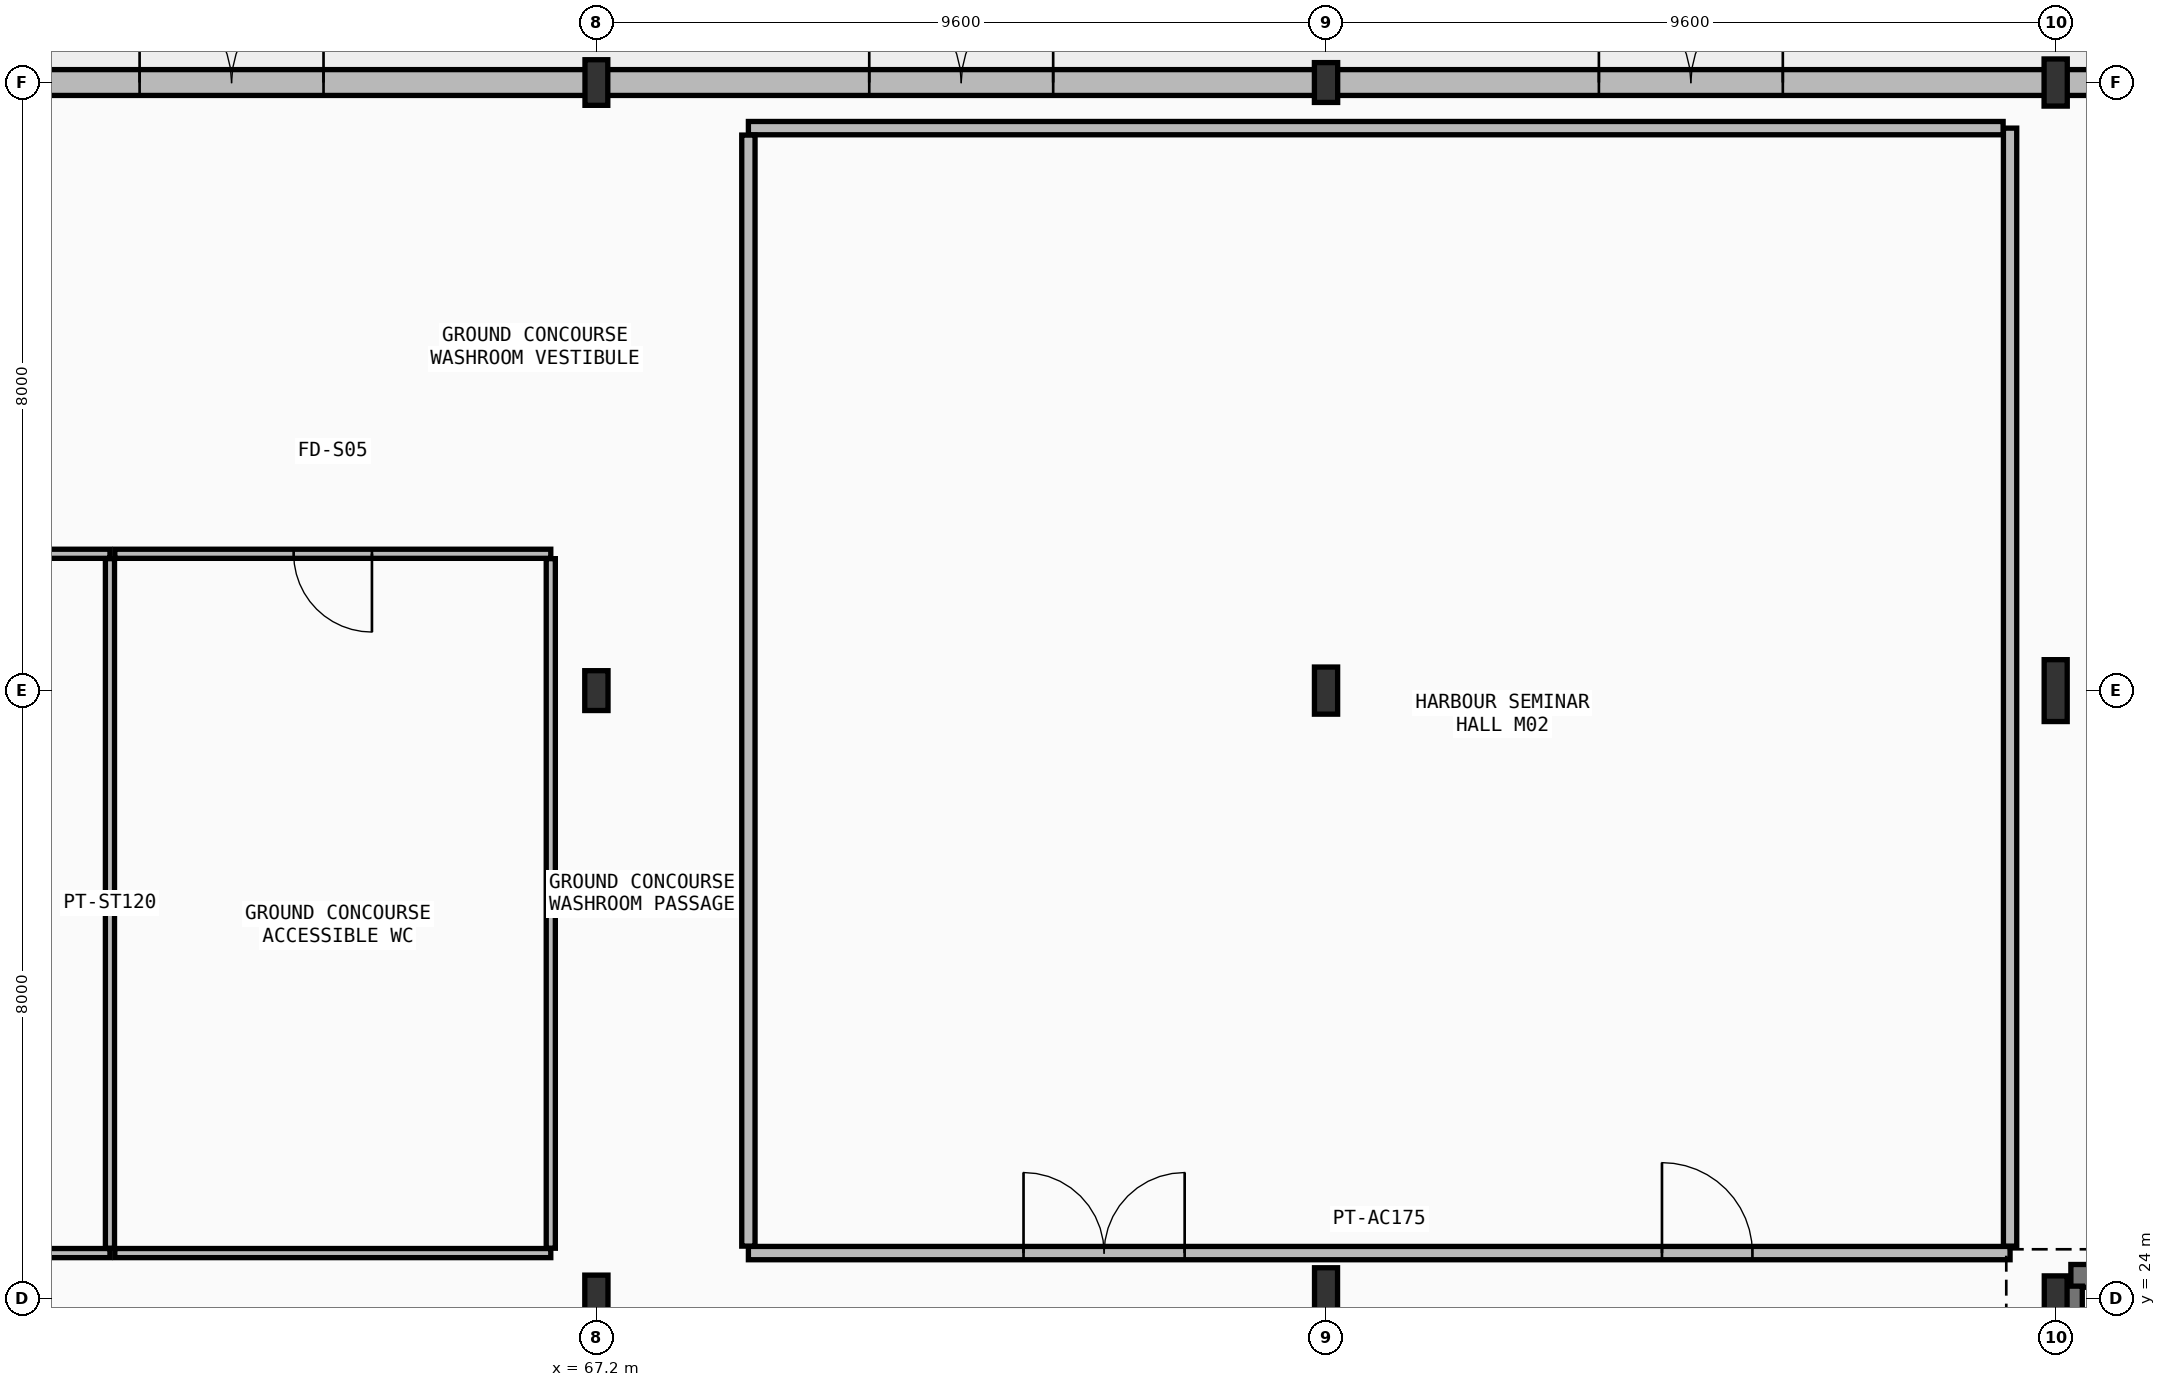
"""IFC4 building model, lengths in metres.
Left out: names, types, materials, properties, quantities, classifications, styles, units other than length and angle.
Written with IfcOpenShell. Run it as: python <this file> out.ifc"""

import sys

from ifc_helpers import new_model, si_unit, direction, frame, frame_2d, origin, origin_2d, place, context, subcontext, project, spatial, rectangle, i_section, extrude, element, fill, save


model = new_model("IFC4")
c1 = context("Model", 3, precision=1e-05, world=origin(), true_north=direction((0.0, 1.0)))
c2 = subcontext(c1, "Body", "Model", "MODEL_VIEW")
j1 = project(units=[si_unit("LENGTHUNIT", "METRE"), si_unit("PLANEANGLEUNIT", "RADIAN")], contexts=[c1])
p1 = place(None, origin())
s1 = spatial("IfcSite", under=j1, at=p1, CompositionType="ELEMENT")
p2 = place(p1, origin())
s2 = spatial("IfcBuilding", under=s1, at=p2, CompositionType="ELEMENT")
p3 = place(p2, origin())
s3 = spatial("IfcBuildingStorey", under=s2, at=p3, CompositionType="ELEMENT", Elevation=0.0)
p4 = place(p3, frame((67.2, 24.0, 0.0), z_axis=(0.0, 0.0, 1.0), x_axis=(1.0, 0.0, 0.0)))
e1 = element("IfcColumn", 1, at=p4, inside=s3, PredefinedType="COLUMN", context=c2, shape_type="SweptSolid", body=[
    extrude(i_section(OverallWidth=0.305, OverallDepth=0.62, WebThickness=0.021, FlangeThickness=0.04, FilletRadius=0.027, at=origin_2d()), origin(), (0.0, 0.0, 1.0), 6.0),
])
p5 = place(p3, frame((67.2, 32.0, 0.0), z_axis=(0.0, 0.0, 1.0), x_axis=(1.0, 0.0, 0.0)))
e2 = element("IfcColumn", 2, at=p5, inside=s3, PredefinedType="COLUMN", context=c2, shape_type="SweptSolid", body=[
    extrude(i_section(OverallWidth=0.306, OverallDepth=0.524, WebThickness=0.021, FlangeThickness=0.04, FilletRadius=0.027, at=origin_2d()), origin(), (0.0, 0.0, 1.0), 6.0),
])
p6 = place(p3, frame((67.2, 40.0, 0.0), z_axis=(0.0, 0.0, 1.0), x_axis=(1.0, 0.0, 0.0)))
e3 = element("IfcColumn", 3, at=p6, inside=s3, PredefinedType="COLUMN", context=c2, shape_type="SweptSolid", body=[
    extrude(i_section(OverallWidth=0.3, OverallDepth=0.6, WebThickness=0.015, FlangeThickness=0.03, FilletRadius=0.027, at=origin_2d()), origin(), (0.0, 0.0, 1.0), 6.0),
])
p7 = place(p3, frame((76.8, 24.0, 0.0), z_axis=(0.0, 0.0, 1.0), x_axis=(1.0, 0.0, 0.0)))
e4 = element("IfcColumn", 4, at=p7, inside=s3, PredefinedType="COLUMN", context=c2, shape_type="SweptSolid", body=[
    extrude(i_section(OverallWidth=0.303, OverallDepth=0.814, WebThickness=0.021, FlangeThickness=0.04, FilletRadius=0.03, at=origin_2d()), origin(), (0.0, 0.0, 1.0), 6.0),
])
p8 = place(p3, frame((76.8, 32.0, 0.0), z_axis=(0.0, 0.0, 1.0), x_axis=(1.0, 0.0, 0.0)))
e5 = element("IfcColumn", 5, at=p8, inside=s3, PredefinedType="COLUMN", context=c2, shape_type="SweptSolid", body=[
    extrude(i_section(OverallWidth=0.305, OverallDepth=0.62, WebThickness=0.021, FlangeThickness=0.04, FilletRadius=0.027, at=origin_2d()), origin(), (0.0, 0.0, 1.0), 6.0),
])
p9 = place(p3, frame((76.8, 40.0, 0.0), z_axis=(0.0, 0.0, 1.0), x_axis=(1.0, 0.0, 0.0)))
e6 = element("IfcColumn", 6, at=p9, inside=s3, PredefinedType="COLUMN", context=c2, shape_type="SweptSolid", body=[
    extrude(i_section(OverallWidth=0.306, OverallDepth=0.524, WebThickness=0.021, FlangeThickness=0.04, FilletRadius=0.027, at=origin_2d()), origin(), (0.0, 0.0, 1.0), 6.0),
])
p10 = place(p3, frame((86.4, 24.0, 0.0), z_axis=(0.0, 0.0, 1.0), x_axis=(1.0, 0.0, 0.0)))
e7 = element("IfcColumn", 7, at=p10, inside=s3, PredefinedType="COLUMN", context=c2, shape_type="SweptSolid", body=[
    extrude(i_section(OverallWidth=0.3, OverallDepth=0.6, WebThickness=0.015, FlangeThickness=0.03, FilletRadius=0.027, at=origin_2d()), origin(), (0.0, 0.0, 1.0), 6.0),
])
p11 = place(p3, frame((86.4, 32.0, 0.0), z_axis=(0.0, 0.0, 1.0), x_axis=(1.0, 0.0, 0.0)))
e8 = element("IfcColumn", 8, at=p11, inside=s3, PredefinedType="COLUMN", context=c2, shape_type="SweptSolid", body=[
    extrude(i_section(OverallWidth=0.303, OverallDepth=0.814, WebThickness=0.021, FlangeThickness=0.04, FilletRadius=0.03, at=origin_2d()), origin(), (0.0, 0.0, 1.0), 6.0),
])
p12 = place(p3, frame((86.4, 40.0, 0.0), z_axis=(0.0, 0.0, 1.0), x_axis=(1.0, 0.0, 0.0)))
e9 = element("IfcColumn", 9, at=p12, inside=s3, PredefinedType="COLUMN", context=c2, shape_type="SweptSolid", body=[
    extrude(i_section(OverallWidth=0.305, OverallDepth=0.62, WebThickness=0.021, FlangeThickness=0.04, FilletRadius=0.027, at=origin_2d()), origin(), (0.0, 0.0, 1.0), 6.0),
])
p13 = place(p3, frame((57.6, 40.0, 0.0), z_axis=(0.0, 0.0, 1.0), x_axis=(1.0, 0.0, 0.0)))
e10 = element("IfcWall", 10, at=p13, inside=s3, PredefinedType="SOLIDWALL", context=c2, shape_type="SweptSolid", body=[
    extrude(rectangle(XDim=9.6, YDim=0.34, at=frame_2d((4.8, 0.0))), origin(), (0.0, 0.0, 1.0), 4.84),
])
p14 = place(p13, frame((3.59, 0.0, 0.0)))
e11 = element("IfcOpeningElement", 11, at=p14, cuts=e10, PredefinedType="OPENING", context=c2, shape_type="SweptSolid", body=[
    extrude(rectangle(XDim=2.42, YDim=2.46, at=frame_2d((1.21, 1.23))), frame((0.0, 0.18, 0.0), z_axis=(0.0, -1.0, 0.0), x_axis=(1.0, 0.0, 0.0)), (0.0, 0.0, 1.0), 0.36),
])
p15 = place(p3, frame((67.2, 40.0, 0.0), z_axis=(0.0, 0.0, 1.0), x_axis=(1.0, 0.0, 0.0)))
e12 = element("IfcWall", 12, at=p15, inside=s3, PredefinedType="SOLIDWALL", context=c2, shape_type="SweptSolid", body=[
    extrude(rectangle(XDim=9.6, YDim=0.34, at=frame_2d((4.8, 0.0))), origin(), (0.0, 0.0, 1.0), 4.94),
])
p16 = place(p15, frame((3.59, 0.0, 0.0)))
e13 = element("IfcOpeningElement", 13, at=p16, cuts=e12, PredefinedType="OPENING", context=c2, shape_type="SweptSolid", body=[
    extrude(rectangle(XDim=2.42, YDim=2.46, at=frame_2d((1.21, 1.23))), frame((0.0, 0.18, 0.0), z_axis=(0.0, -1.0, 0.0), x_axis=(1.0, 0.0, 0.0)), (0.0, 0.0, 1.0), 0.36),
])
p17 = place(p3, frame((76.8, 40.0, 0.0), z_axis=(0.0, 0.0, 1.0), x_axis=(1.0, 0.0, 0.0)))
e14 = element("IfcWall", 14, at=p17, inside=s3, PredefinedType="SOLIDWALL", context=c2, shape_type="SweptSolid", body=[
    extrude(rectangle(XDim=9.6, YDim=0.34, at=frame_2d((4.8, 0.0))), origin(), (0.0, 0.0, 1.0), 5.09),
])
p18 = place(p17, frame((3.59, 0.0, 0.0)))
e15 = element("IfcOpeningElement", 15, at=p18, cuts=e14, PredefinedType="OPENING", context=c2, shape_type="SweptSolid", body=[
    extrude(rectangle(XDim=2.42, YDim=2.46, at=frame_2d((1.21, 1.23))), frame((0.0, 0.18, 0.0), z_axis=(0.0, -1.0, 0.0), x_axis=(1.0, 0.0, 0.0)), (0.0, 0.0, 1.0), 0.36),
])
p19 = place(p3, frame((86.4, 40.0, 0.0), z_axis=(0.0, 0.0, 1.0), x_axis=(1.0, 0.0, 0.0)))
e16 = element("IfcWall", 16, at=p19, inside=s3, PredefinedType="SOLIDWALL", context=c2, shape_type="SweptSolid", body=[
    extrude(rectangle(XDim=9.6, YDim=0.34, at=frame_2d((4.8, 0.0))), origin(), (0.0, 0.0, 1.0), 5.24),
])
p20 = place(p19, frame((3.59, 0.0, 0.0)))
e17 = element("IfcOpeningElement", 17, at=p20, cuts=e16, PredefinedType="OPENING", context=c2, shape_type="SweptSolid", body=[
    extrude(rectangle(XDim=2.42, YDim=2.46, at=frame_2d((1.21, 1.23))), frame((0.0, 0.18, 0.0), z_axis=(0.0, -1.0, 0.0), x_axis=(1.0, 0.0, 0.0)), (0.0, 0.0, 1.0), 0.36),
])
p21 = place(p3, frame((89.2, 24.3, 0.0), z_axis=(0.0, 0.0, 1.0), x_axis=(-1.0, 0.0, 0.0)))
e18 = element("IfcWall", 18, at=p21, inside=s3, PredefinedType="SHEAR", context=c2, shape_type="SweptSolid", body=[
    extrude(rectangle(XDim=2.6, YDim=0.3, at=frame_2d((1.3, 0.0))), origin(), (0.0, 0.0, 1.0), 5.77),
])
p22 = place(p3, frame((86.6, 24.165, 0.0), z_axis=(0.0, 0.0, 1.0), x_axis=(0.0, -1.0, 0.0)))
e19 = element("IfcWall", 19, at=p22, inside=s3, PredefinedType="SHEAR", context=c2, shape_type="SweptSolid", body=[
    extrude(rectangle(XDim=2.5, YDim=0.3, at=frame_2d((1.25, 0.0))), origin(), (0.0, 0.0, 1.0), 5.77),
])
p23 = place(p3, frame((69.2, 24.6, 0.0), z_axis=(0.0, 0.0, 1.0), x_axis=(1.0, 0.0, 0.0)))
e20 = element("IfcWall", 20, at=p23, inside=s3, PredefinedType="PARTITIONING", context=c2, shape_type="SweptSolid", body=[
    extrude(rectangle(XDim=16.6, YDim=0.175, at=frame_2d((8.3, 0.0))), origin(), (0.0, 0.0, 1.0), 5.04),
])
p24 = place(p23, frame((3.62, 0.0, 0.0)))
e21 = element("IfcOpeningElement", 21, at=p24, cuts=e20, PredefinedType="OPENING", context=c2, shape_type="SweptSolid", body=[
    extrude(rectangle(XDim=2.12, YDim=2.38, at=frame_2d((1.06, 1.19))), frame((0.0, 0.097, 0.0), z_axis=(0.0, -1.0, 0.0), x_axis=(1.0, 0.0, 0.0)), (0.0, 0.0, 1.0), 0.195),
])
p25 = place(p23, frame((12.02, 0.0, 0.0)))
e22 = element("IfcOpeningElement", 22, at=p25, cuts=e20, PredefinedType="OPENING", context=c2, shape_type="SweptSolid", body=[
    extrude(rectangle(XDim=1.19, YDim=2.34, at=frame_2d((0.595, 1.17))), frame((0.0, 0.097, 0.0), z_axis=(0.0, -1.0, 0.0), x_axis=(1.0, 0.0, 0.0)), (0.0, 0.0, 1.0), 0.195),
])
p26 = place(p3, frame((85.8, 24.691, 0.0), z_axis=(0.0, 0.0, 1.0), x_axis=(0.0, 1.0, 0.0)))
e23 = element("IfcWall", 23, at=p26, inside=s3, PredefinedType="PARTITIONING", context=c2, shape_type="SweptSolid", body=[
    extrude(rectangle(XDim=14.708, YDim=0.175, at=frame_2d((7.354, 0.0))), origin(), (0.0, 0.0, 1.0), 5.14),
])
p27 = place(p3, frame((85.708, 39.4, 0.0), z_axis=(0.0, 0.0, 1.0), x_axis=(-1.0, 0.0, 0.0)))
e24 = element("IfcWall", 24, at=p27, inside=s3, PredefinedType="PARTITIONING", context=c2, shape_type="SweptSolid", body=[
    extrude(rectangle(XDim=16.509, YDim=0.175, at=frame_2d((8.254, 0.0))), origin(), (0.0, 0.0, 1.0), 5.14),
])
p28 = place(p3, frame((69.2, 39.309, 0.0), z_axis=(0.0, 0.0, 1.0), x_axis=(0.0, -1.0, 0.0)))
e25 = element("IfcWall", 25, at=p28, inside=s3, PredefinedType="PARTITIONING", context=c2, shape_type="SweptSolid", body=[
    extrude(rectangle(XDim=14.617, YDim=0.175, at=frame_2d((7.309, 0.0))), origin(), (0.0, 0.0, 1.0), 5.04),
])
p29 = place(p3, frame((60.8, 33.8, 0.0), z_axis=(0.0, 0.0, 1.0), x_axis=(-1.0, 0.0, 0.0)))
e26 = element("IfcWall", 26, at=p29, inside=s3, PredefinedType="PARTITIONING", context=c2, shape_type="SweptSolid", body=[
    extrude(rectangle(XDim=6.254, YDim=0.12, at=frame_2d((3.127, 0.0))), origin(), (0.0, 0.0, 1.0), 4.84),
])
p30 = place(p29, frame((2.627, 0.0, 0.0)))
e27 = element("IfcOpeningElement", 27, at=p30, cuts=e26, PredefinedType="OPENING", context=c2, shape_type="SweptSolid", body=[
    extrude(rectangle(XDim=1.0, YDim=2.12, at=frame_2d((0.5, 1.06))), frame((0.0, 0.07, 0.0), z_axis=(0.0, -1.0, 0.0), x_axis=(1.0, 0.0, 0.0)), (0.0, 0.0, 1.0), 0.14),
])
p31 = place(p3, frame((54.546, 24.6, 0.0), z_axis=(0.0, 0.0, 1.0), x_axis=(1.0, 0.0, 0.0)))
e28 = element("IfcWall", 28, at=p31, inside=s3, PredefinedType="PARTITIONING", context=c2, shape_type="SweptSolid", body=[
    extrude(rectangle(XDim=6.254, YDim=0.12, at=frame_2d((3.127, 0.0))), origin(), (0.0, 0.0, 1.0), 5.19),
])
p32 = place(p3, frame((60.8, 24.664, 0.0), z_axis=(0.0, 0.0, 1.0), x_axis=(0.0, 1.0, 0.0)))
e29 = element("IfcWall", 29, at=p32, inside=s3, PredefinedType="PARTITIONING", context=c2, shape_type="SweptSolid", body=[
    extrude(rectangle(XDim=9.072, YDim=0.12, at=frame_2d((4.536, 0.0))), origin(), (0.0, 0.0, 1.0), 4.94),
])
p33 = place(p3, frame((66.6, 33.8, 0.0), z_axis=(0.0, 0.0, 1.0), x_axis=(-1.0, 0.0, 0.0)))
e30 = element("IfcWall", 30, at=p33, inside=s3, PredefinedType="PARTITIONING", context=c2, shape_type="SweptSolid", body=[
    extrude(rectangle(XDim=5.736, YDim=0.12, at=frame_2d((2.868, 0.0))), origin(), (0.0, 0.0, 1.0), 5.77),
])
p34 = place(p33, frame((2.353, 0.0, 0.0)))
e31 = element("IfcOpeningElement", 31, at=p34, cuts=e30, PredefinedType="OPENING", context=c2, shape_type="SweptSolid", body=[
    extrude(rectangle(XDim=1.03, YDim=2.14, at=frame_2d((0.515, 1.07))), frame((0.0, 0.07, 0.0), z_axis=(0.0, -1.0, 0.0), x_axis=(1.0, 0.0, 0.0)), (0.0, 0.0, 1.0), 0.14),
])
p35 = place(p3, frame((60.864, 24.6, 0.0), z_axis=(0.0, 0.0, 1.0), x_axis=(1.0, 0.0, 0.0)))
e32 = element("IfcWall", 32, at=p35, inside=s3, PredefinedType="PARTITIONING", context=c2, shape_type="SweptSolid", body=[
    extrude(rectangle(XDim=5.736, YDim=0.12, at=frame_2d((2.868, 0.0))), origin(), (0.0, 0.0, 1.0), 5.77),
])
p36 = place(p3, frame((66.6, 24.664, 0.0), z_axis=(0.0, 0.0, 1.0), x_axis=(0.0, 1.0, 0.0)))
e33 = element("IfcWall", 33, at=p36, inside=s3, PredefinedType="PARTITIONING", context=c2, shape_type="SweptSolid", body=[
    extrude(rectangle(XDim=9.072, YDim=0.12, at=frame_2d((4.536, 0.0))), origin(), (0.0, 0.0, 1.0), 4.94),
])
p37 = place(p14, origin())
e34 = element("IfcDoor", 34, at=p37, inside=s3, OperationType="DOUBLE_DOOR_SINGLE_SWING", PredefinedType="DOOR", context=c2, shape_type="SweptSolid", body=[
    extrude(rectangle(XDim=2.42, YDim=2.46, at=frame_2d((1.21, 1.23))), frame((0.0, 0.025, 0.0), z_axis=(0.0, -1.0, 0.0), x_axis=(1.0, 0.0, 0.0)), (0.0, 0.0, 1.0), 0.05),
])
fill(e11, e34)
p38 = place(p16, origin())
e35 = element("IfcDoor", 35, at=p38, inside=s3, OperationType="DOUBLE_DOOR_SINGLE_SWING", PredefinedType="DOOR", context=c2, shape_type="SweptSolid", body=[
    extrude(rectangle(XDim=2.42, YDim=2.46, at=frame_2d((1.21, 1.23))), frame((0.0, 0.025, 0.0), z_axis=(0.0, -1.0, 0.0), x_axis=(1.0, 0.0, 0.0)), (0.0, 0.0, 1.0), 0.05),
])
fill(e13, e35)
p39 = place(p18, origin())
e36 = element("IfcDoor", 36, at=p39, inside=s3, OperationType="DOUBLE_DOOR_SINGLE_SWING", PredefinedType="DOOR", context=c2, shape_type="SweptSolid", body=[
    extrude(rectangle(XDim=2.42, YDim=2.46, at=frame_2d((1.21, 1.23))), frame((0.0, 0.025, 0.0), z_axis=(0.0, -1.0, 0.0), x_axis=(1.0, 0.0, 0.0)), (0.0, 0.0, 1.0), 0.05),
])
fill(e15, e36)
p40 = place(p24, origin())
e37 = element("IfcDoor", 37, at=p40, inside=s3, OperationType="DOUBLE_DOOR_SINGLE_SWING", PredefinedType="DOOR", context=c2, shape_type="SweptSolid", body=[
    extrude(rectangle(XDim=2.12, YDim=2.38, at=frame_2d((1.06, 1.19))), frame((0.0, 0.025, 0.0), z_axis=(0.0, -1.0, 0.0), x_axis=(1.0, 0.0, 0.0)), (0.0, 0.0, 1.0), 0.05),
])
fill(e21, e37)
p41 = place(p25, origin())
e38 = element("IfcDoor", 38, at=p41, inside=s3, OperationType="SINGLE_SWING_RIGHT", PredefinedType="DOOR", context=c2, shape_type="SweptSolid", body=[
    extrude(rectangle(XDim=1.19, YDim=2.34, at=frame_2d((0.595, 1.17))), frame((0.0, 0.025, 0.0), z_axis=(0.0, -1.0, 0.0), x_axis=(1.0, 0.0, 0.0)), (0.0, 0.0, 1.0), 0.05),
])
fill(e22, e38)
p42 = place(p34, origin())
e39 = element("IfcDoor", 39, at=p42, inside=s3, OperationType="SINGLE_SWING_LEFT", PredefinedType="DOOR", context=c2, shape_type="SweptSolid", body=[
    extrude(rectangle(XDim=1.03, YDim=2.14, at=frame_2d((0.515, 1.07))), frame((0.0, 0.025, 0.0), z_axis=(0.0, -1.0, 0.0), x_axis=(1.0, 0.0, 0.0)), (0.0, 0.0, 1.0), 0.05),
])
fill(e31, e39)
save(model, sys.argv[1])
